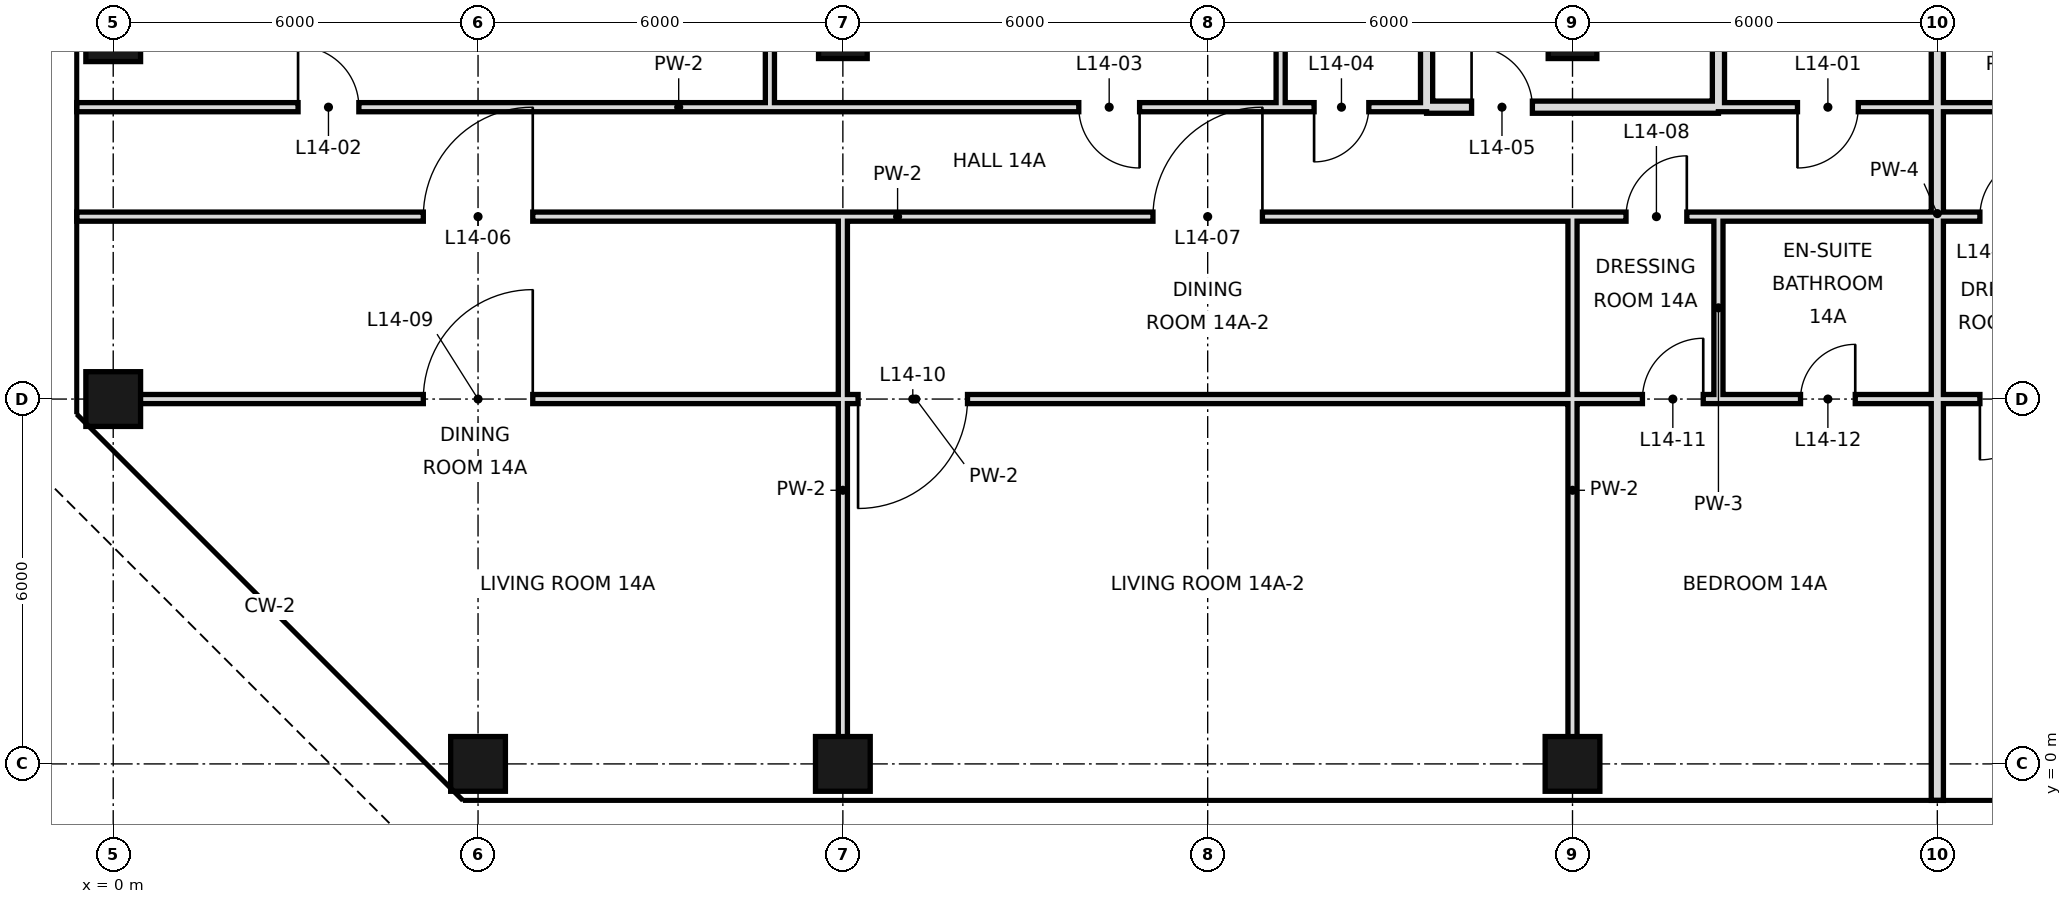
"""IFC4 building model, lengths in metres.
Left out: names, types, materials, properties, quantities, classifications, styles, units other than length and angle.
Written with IfcOpenShell. Run it as: python <this file> out.ifc"""

import sys

from ifc_helpers import new_model, si_unit, direction, frame, frame_2d, origin, origin_2d, place, context, subcontext, project, spatial, rectangle, hollow_rectangle, extrude, element, fill, save


model = new_model("IFC4")
c1 = context("Model", 3, precision=1e-05, world=origin(), true_north=direction((0.0, 1.0)))
c2 = subcontext(c1, "Body", "Model", "MODEL_VIEW")
j1 = project(units=[si_unit("LENGTHUNIT", "METRE"), si_unit("PLANEANGLEUNIT", "RADIAN")], contexts=[c1])
p1 = place(None, origin())
s1 = spatial("IfcSite", under=j1, at=p1, CompositionType="ELEMENT")
p2 = place(p1, origin())
s2 = spatial("IfcBuilding", under=s1, at=p2, CompositionType="ELEMENT")
p3 = place(p2, frame((0.0, 0.0, 71.4)))
s3 = spatial("IfcBuildingStorey", under=s2, at=p3, CompositionType="ELEMENT", Elevation=71.4)
for number, where, z_axis, x_axis in (
    (1, (0.0, 6.0, 0.0), (0.0, 0.0, 1.0), (1.0, 0.0, 0.0)),
    (2, (0.0, 12.0, 0.0), (0.0, 0.0, 1.0), (1.0, 0.0, 0.0)),
    (3, (6.0, 0.0, 0.0), (0.0, 0.0, 1.0), (1.0, 0.0, 0.0)),
    (4, (12.0, 0.0, 0.0), (0.0, 0.0, 1.0), (1.0, 0.0, 0.0)),
):
    element("IfcColumn", number, at=place(p3, frame(where, z_axis=z_axis, x_axis=x_axis)), inside=s3, PredefinedType="COLUMN", context=c2, shape_type="SweptSolid", body=[
        extrude(hollow_rectangle(XDim=0.9, YDim=0.9, WallThickness=0.045, at=origin_2d()), origin(), (0.0, 0.0, 1.0), 3.6),
    ])
p4 = place(p3, frame((12.0, 12.0, 0.0), z_axis=(0.0, 0.0, 1.0), x_axis=(1.0, 0.0, 0.0)))
e5 = element("IfcColumn", 5, at=p4, inside=s3, PredefinedType="COLUMN", context=c2, shape_type="SweptSolid", body=[
    extrude(hollow_rectangle(XDim=0.8, YDim=0.8, WallThickness=0.04, at=origin_2d()), origin(), (0.0, 0.0, 1.0), 3.6),
])
p5 = place(p3, frame((24.0, 0.0, 0.0), z_axis=(0.0, 0.0, 1.0), x_axis=(1.0, 0.0, 0.0)))
e6 = element("IfcColumn", 6, at=p5, inside=s3, PredefinedType="COLUMN", context=c2, shape_type="SweptSolid", body=[
    extrude(hollow_rectangle(XDim=0.9, YDim=0.9, WallThickness=0.045, at=origin_2d()), origin(), (0.0, 0.0, 1.0), 3.6),
])
p6 = place(p3, frame((24.0, 12.0, 0.0), z_axis=(0.0, 0.0, 1.0), x_axis=(1.0, 0.0, 0.0)))
e7 = element("IfcColumn", 7, at=p6, inside=s3, PredefinedType="COLUMN", context=c2, shape_type="SweptSolid", body=[
    extrude(hollow_rectangle(XDim=0.8, YDim=0.8, WallThickness=0.04, at=origin_2d()), origin(), (0.0, 0.0, 1.0), 3.6),
])
p7 = place(p3, frame((10.8, 10.8, 0.0), z_axis=(0.0, 0.0, 1.0), x_axis=(0.0, 1.0, 0.0)))
e8 = element("IfcWall", 8, at=p7, inside=s3, PredefinedType="PARTITIONING", context=c2, shape_type="SweptSolid", body=[
    extrude(rectangle(XDim=7.9, YDim=0.15, at=frame_2d((3.95, 0.0))), origin(), (0.0, 0.0, 1.0), 3.42),
])
p8 = place(p3, frame((12.0, 0.0, 0.0), z_axis=(0.0, 0.0, 1.0), x_axis=(0.0, 1.0, 0.0)))
e9 = element("IfcWall", 9, at=p8, inside=s3, PredefinedType="PARTITIONING", context=c2, shape_type="SweptSolid", body=[
    extrude(rectangle(XDim=9.0, YDim=0.15, at=frame_2d((4.5, 0.0))), origin(), (0.0, 0.0, 1.0), 2.72),
])
p9 = place(p3, frame((19.2, 10.8, 0.0), z_axis=(0.0, 0.0, 1.0), x_axis=(0.0, 1.0, 0.0)))
e10 = element("IfcWall", 10, at=p9, inside=s3, PredefinedType="PARTITIONING", context=c2, shape_type="SweptSolid", body=[
    extrude(rectangle(XDim=7.9, YDim=0.15, at=frame_2d((3.95, 0.0))), origin(), (0.0, 0.0, 1.0), 3.42),
])
p10 = place(p3, frame((21.6, 10.8, 0.0), z_axis=(0.0, 0.0, 1.0), x_axis=(0.0, 1.0, 0.0)))
e11 = element("IfcWall", 11, at=p10, inside=s3, PredefinedType="SOLIDWALL", context=c2, shape_type="SweptSolid", body=[
    extrude(rectangle(XDim=7.9, YDim=0.2, at=frame_2d((3.95, 0.0))), origin(), (0.0, 0.0, 1.0), 2.72),
])
p11 = place(p3, frame((24.0, 0.0, 0.0), z_axis=(0.0, 0.0, 1.0), x_axis=(0.0, 1.0, 0.0)))
e12 = element("IfcWall", 12, at=p11, inside=s3, PredefinedType="PARTITIONING", context=c2, shape_type="SweptSolid", body=[
    extrude(rectangle(XDim=9.0, YDim=0.15, at=frame_2d((4.5, 0.0))), origin(), (0.0, 0.0, 1.0), 2.72),
])
p12 = place(p3, frame((26.4, 10.8, 0.0), z_axis=(0.0, 0.0, 1.0), x_axis=(0.0, 1.0, 0.0)))
e13 = element("IfcWall", 13, at=p12, inside=s3, PredefinedType="SOLIDWALL", context=c2, shape_type="SweptSolid", body=[
    extrude(rectangle(XDim=7.9, YDim=0.2, at=frame_2d((3.95, 0.0))), origin(), (0.0, 0.0, 1.0), 2.72),
])
p13 = place(p3, frame((26.4, 6.0, 0.0), z_axis=(0.0, 0.0, 1.0), x_axis=(0.0, 1.0, 0.0)))
e14 = element("IfcWall", 14, at=p13, inside=s3, PredefinedType="PARTITIONING", context=c2, shape_type="SweptSolid", body=[
    extrude(rectangle(XDim=3.0, YDim=0.15, at=frame_2d((1.5, 0.0))), origin(), (0.0, 0.0, 1.0), 3.42),
])
p14 = place(p3, frame((30.0, -0.6, 0.0), z_axis=(0.0, 0.0, 1.0), x_axis=(0.0, 1.0, 0.0)))
e15 = element("IfcWall", 15, at=p14, inside=s3, PredefinedType="SOLIDWALL", context=c2, shape_type="SweptSolid", body=[
    extrude(rectangle(XDim=19.3, YDim=0.2, at=frame_2d((9.65, 0.0))), origin(), (0.0, 0.0, 1.0), 2.72),
])
p15 = place(p3, frame((21.6, 10.8, 0.0), z_axis=(0.0, 0.0, 1.0), x_axis=(1.0, 0.0, 0.0)))
e16 = element("IfcWall", 16, at=p15, inside=s3, PredefinedType="SOLIDWALL", context=c2, shape_type="SweptSolid", body=[
    extrude(rectangle(XDim=4.8, YDim=0.2, at=frame_2d((2.4, 0.0))), origin(), (0.0, 0.0, 1.0), 2.72),
])
p16 = place(p15, frame((0.74, 0.0, 0.0)))
e17 = element("IfcOpeningElement", 17, at=p16, cuts=e16, PredefinedType="OPENING", context=c2, shape_type="SweptSolid", body=[
    extrude(rectangle(XDim=1.0, YDim=2.4, at=frame_2d((0.5, 1.2))), frame((0.0, 0.11, 0.0), z_axis=(0.0, -1.0, 0.0), x_axis=(1.0, 0.0, 0.0)), (0.0, 0.0, 1.0), 0.22),
])
p17 = place(p3, frame((-0.6, 10.8, 0.0), z_axis=(0.0, 0.0, 1.0), x_axis=(1.0, 0.0, 0.0)))
e18 = element("IfcWall", 18, at=p17, inside=s3, PredefinedType="PARTITIONING", context=c2, shape_type="SweptSolid", body=[
    extrude(rectangle(XDim=19.8, YDim=0.15, at=frame_2d((9.9, 0.0))), origin(), (0.0, 0.0, 1.0), 3.42),
])
p18 = place(p17, frame((3.64, 0.0, 0.0)))
e19 = element("IfcOpeningElement", 19, at=p18, cuts=e18, PredefinedType="OPENING", context=c2, shape_type="SweptSolid", body=[
    extrude(rectangle(XDim=1.0, YDim=2.4, at=frame_2d((0.5, 1.2))), frame((0.0, 0.085, 0.0), z_axis=(0.0, -1.0, 0.0), x_axis=(1.0, 0.0, 0.0)), (0.0, 0.0, 1.0), 0.17),
])
p19 = place(p17, frame((16.48, 0.0, 0.0)))
e20 = element("IfcOpeningElement", 20, at=p19, cuts=e18, PredefinedType="OPENING", context=c2, shape_type="SweptSolid", body=[
    extrude(rectangle(XDim=1.0, YDim=2.4, at=frame_2d((0.5, 1.2))), frame((0.0, 0.085, 0.0), z_axis=(0.0, -1.0, 0.0), x_axis=(1.0, 0.0, 0.0)), (0.0, 0.0, 1.0), 0.17),
])
p20 = place(p3, frame((26.4, 10.8, 0.0), z_axis=(0.0, 0.0, 1.0), x_axis=(1.0, 0.0, 0.0)))
e21 = element("IfcWall", 21, at=p20, inside=s3, PredefinedType="PARTITIONING", context=c2, shape_type="SweptSolid", body=[
    extrude(rectangle(XDim=9.6, YDim=0.15, at=frame_2d((4.8, 0.0))), origin(), (0.0, 0.0, 1.0), 3.42),
])
p21 = place(p20, frame((1.3, 0.0, 0.0)))
e22 = element("IfcOpeningElement", 22, at=p21, cuts=e21, PredefinedType="OPENING", context=c2, shape_type="SweptSolid", body=[
    extrude(rectangle(XDim=1.0, YDim=2.4, at=frame_2d((0.5, 1.2))), frame((0.0, 0.085, 0.0), z_axis=(0.0, -1.0, 0.0), x_axis=(1.0, 0.0, 0.0)), (0.0, 0.0, 1.0), 0.17),
])
p22 = place(p20, frame((7.0, 0.0, 0.0)))
e23 = element("IfcOpeningElement", 23, at=p22, cuts=e21, PredefinedType="OPENING", context=c2, shape_type="SweptSolid", body=[
    extrude(rectangle(XDim=1.0, YDim=2.4, at=frame_2d((0.5, 1.2))), frame((0.0, 0.085, 0.0), z_axis=(0.0, -1.0, 0.0), x_axis=(1.0, 0.0, 0.0)), (0.0, 0.0, 1.0), 0.17),
])
p23 = place(p3, frame((19.2, 10.8, 0.0), z_axis=(0.0, 0.0, 1.0), x_axis=(1.0, 0.0, 0.0)))
e24 = element("IfcWall", 24, at=p23, inside=s3, PredefinedType="PARTITIONING", context=c2, shape_type="SweptSolid", body=[
    extrude(rectangle(XDim=2.4, YDim=0.15, at=frame_2d((1.2, 0.0))), origin(), (0.0, 0.0, 1.0), 3.42),
])
p24 = place(p23, frame((0.55, 0.0, 0.0)))
e25 = element("IfcOpeningElement", 25, at=p24, cuts=e24, PredefinedType="OPENING", context=c2, shape_type="SweptSolid", body=[
    extrude(rectangle(XDim=0.9, YDim=2.4, at=frame_2d((0.45, 1.2))), frame((0.0, 0.085, 0.0), z_axis=(0.0, -1.0, 0.0), x_axis=(1.0, 0.0, 0.0)), (0.0, 0.0, 1.0), 0.17),
])
p25 = place(p3, frame((0.0, 6.0, 0.0), z_axis=(0.0, 0.0, 1.0), x_axis=(1.0, 0.0, 0.0)))
e26 = element("IfcWall", 26, at=p25, inside=s3, PredefinedType="PARTITIONING", context=c2, shape_type="SweptSolid", body=[
    extrude(rectangle(XDim=26.4, YDim=0.15, at=frame_2d((13.2, 0.0))), origin(), (0.0, 0.0, 1.0), 2.97),
])
p26 = place(p25, frame((5.1, 0.0, 0.0)))
e27 = element("IfcOpeningElement", 27, at=p26, cuts=e26, PredefinedType="OPENING", context=c2, shape_type="SweptSolid", body=[
    extrude(rectangle(XDim=1.8, YDim=2.4, at=frame_2d((0.9, 1.2))), frame((0.0, 0.085, 0.0), z_axis=(0.0, -1.0, 0.0), x_axis=(1.0, 0.0, 0.0)), (0.0, 0.0, 1.0), 0.17),
])
p27 = place(p25, frame((12.25, 0.0, 0.0)))
e28 = element("IfcOpeningElement", 28, at=p27, cuts=e26, PredefinedType="OPENING", context=c2, shape_type="SweptSolid", body=[
    extrude(rectangle(XDim=1.8, YDim=2.4, at=frame_2d((0.9, 1.2))), frame((0.0, 0.085, 0.0), z_axis=(0.0, -1.0, 0.0), x_axis=(1.0, 0.0, 0.0)), (0.0, 0.0, 1.0), 0.17),
])
p28 = place(p25, frame((25.15, 0.0, 0.0)))
e29 = element("IfcOpeningElement", 29, at=p28, cuts=e26, PredefinedType="OPENING", context=c2, shape_type="SweptSolid", body=[
    extrude(rectangle(XDim=1.0, YDim=2.4, at=frame_2d((0.5, 1.2))), frame((0.0, 0.085, 0.0), z_axis=(0.0, -1.0, 0.0), x_axis=(1.0, 0.0, 0.0)), (0.0, 0.0, 1.0), 0.17),
])
p29 = place(p3, frame((30.0, 6.0, 0.0), z_axis=(0.0, 0.0, 1.0), x_axis=(1.0, 0.0, 0.0)))
e30 = element("IfcWall", 30, at=p29, inside=s3, PredefinedType="PARTITIONING", context=c2, shape_type="SweptSolid", body=[
    extrude(rectangle(XDim=2.4, YDim=0.15, at=frame_2d((1.2, 0.0))), origin(), (0.0, 0.0, 1.0), 2.97),
])
p30 = place(p29, frame((0.7, 0.0, 0.0)))
e31 = element("IfcOpeningElement", 31, at=p30, cuts=e30, PredefinedType="OPENING", context=c2, shape_type="SweptSolid", body=[
    extrude(rectangle(XDim=1.0, YDim=2.4, at=frame_2d((0.5, 1.2))), frame((0.0, 0.085, 0.0), z_axis=(0.0, -1.0, 0.0), x_axis=(1.0, 0.0, 0.0)), (0.0, 0.0, 1.0), 0.17),
])
p31 = place(p3, frame((26.4, 6.0, 0.0), z_axis=(0.0, 0.0, 1.0), x_axis=(1.0, 0.0, 0.0)))
e32 = element("IfcWall", 32, at=p31, inside=s3, PredefinedType="PARTITIONING", context=c2, shape_type="SweptSolid", body=[
    extrude(rectangle(XDim=3.6, YDim=0.15, at=frame_2d((1.8, 0.0))), origin(), (0.0, 0.0, 1.0), 2.97),
])
p32 = place(p31, frame((1.35, 0.0, 0.0)))
e33 = element("IfcOpeningElement", 33, at=p32, cuts=e32, PredefinedType="OPENING", context=c2, shape_type="SweptSolid", body=[
    extrude(rectangle(XDim=0.9, YDim=2.4, at=frame_2d((0.45, 1.2))), frame((0.0, 0.085, 0.0), z_axis=(0.0, -1.0, 0.0), x_axis=(1.0, 0.0, 0.0)), (0.0, 0.0, 1.0), 0.17),
])
p33 = place(p3, frame((-0.6, 9.0, 0.0), z_axis=(0.0, 0.0, 1.0), x_axis=(1.0, 0.0, 0.0)))
e34 = element("IfcWall", 34, at=p33, inside=s3, PredefinedType="PARTITIONING", context=c2, shape_type="SweptSolid", body=[
    extrude(rectangle(XDim=27.0, YDim=0.15, at=frame_2d((13.5, 0.0))), origin(), (0.0, 0.0, 1.0), 3.42),
])
p34 = place(p33, frame((5.7, 0.0, 0.0)))
e35 = element("IfcOpeningElement", 35, at=p34, cuts=e34, PredefinedType="OPENING", context=c2, shape_type="SweptSolid", body=[
    extrude(rectangle(XDim=1.8, YDim=2.4, at=frame_2d((0.9, 1.2))), frame((0.0, 0.085, 0.0), z_axis=(0.0, -1.0, 0.0), x_axis=(1.0, 0.0, 0.0)), (0.0, 0.0, 1.0), 0.17),
])
p35 = place(p33, frame((17.7, 0.0, 0.0)))
e36 = element("IfcOpeningElement", 36, at=p35, cuts=e34, PredefinedType="OPENING", context=c2, shape_type="SweptSolid", body=[
    extrude(rectangle(XDim=1.8, YDim=2.4, at=frame_2d((0.9, 1.2))), frame((0.0, 0.085, 0.0), z_axis=(0.0, -1.0, 0.0), x_axis=(1.0, 0.0, 0.0)), (0.0, 0.0, 1.0), 0.17),
])
p36 = place(p33, frame((25.48, 0.0, 0.0)))
e37 = element("IfcOpeningElement", 37, at=p36, cuts=e34, PredefinedType="OPENING", context=c2, shape_type="SweptSolid", body=[
    extrude(rectangle(XDim=1.0, YDim=2.4, at=frame_2d((0.5, 1.2))), frame((0.0, 0.085, 0.0), z_axis=(0.0, -1.0, 0.0), x_axis=(1.0, 0.0, 0.0)), (0.0, 0.0, 1.0), 0.17),
])
p37 = place(p3, frame((30.0, 9.0, 0.0), z_axis=(0.0, 0.0, 1.0), x_axis=(1.0, 0.0, 0.0)))
e38 = element("IfcWall", 38, at=p37, inside=s3, PredefinedType="PARTITIONING", context=c2, shape_type="SweptSolid", body=[
    extrude(rectangle(XDim=2.4, YDim=0.15, at=frame_2d((1.2, 0.0))), origin(), (0.0, 0.0, 1.0), 3.42),
])
p38 = place(p37, frame((0.7, 0.0, 0.0)))
e39 = element("IfcOpeningElement", 39, at=p38, cuts=e38, PredefinedType="OPENING", context=c2, shape_type="SweptSolid", body=[
    extrude(rectangle(XDim=1.0, YDim=2.4, at=frame_2d((0.5, 1.2))), frame((0.0, 0.085, 0.0), z_axis=(0.0, -1.0, 0.0), x_axis=(1.0, 0.0, 0.0)), (0.0, 0.0, 1.0), 0.17),
])
p39 = place(p3, frame((26.4, 9.0, 0.0), z_axis=(0.0, 0.0, 1.0), x_axis=(1.0, 0.0, 0.0)))
e40 = element("IfcWall", 40, at=p39, inside=s3, PredefinedType="PARTITIONING", context=c2, shape_type="SweptSolid", body=[
    extrude(rectangle(XDim=3.6, YDim=0.15, at=frame_2d((1.8, 0.0))), origin(), (0.0, 0.0, 1.0), 3.42),
])
p40 = place(p21, frame((1.0, 0.0, 0.0), z_axis=(0.0, 0.0, 1.0), x_axis=(-1.0, 0.0, 0.0)))
e41 = element("IfcDoor", 41, at=p40, inside=s3, OperationType="SINGLE_SWING_RIGHT", PredefinedType="DOOR", context=c2, shape_type="SweptSolid", body=[
    extrude(rectangle(XDim=1.0, YDim=2.4, at=frame_2d((0.5, 1.2))), frame((0.0, 0.025, 0.0), z_axis=(0.0, -1.0, 0.0), x_axis=(1.0, 0.0, 0.0)), (0.0, 0.0, 1.0), 0.05),
])
fill(e22, e41)
p41 = place(p18, origin())
e42 = element("IfcDoor", 42, at=p41, inside=s3, OperationType="SINGLE_SWING_LEFT", PredefinedType="DOOR", context=c2, shape_type="SweptSolid", body=[
    extrude(rectangle(XDim=1.0, YDim=2.4, at=frame_2d((0.5, 1.2))), frame((0.0, 0.025, 0.0), z_axis=(0.0, -1.0, 0.0), x_axis=(1.0, 0.0, 0.0)), (0.0, 0.0, 1.0), 0.05),
])
fill(e19, e42)
p42 = place(p19, origin())
e43 = element("IfcDoor", 43, at=p42, inside=s3, OperationType="SINGLE_SWING_RIGHT", PredefinedType="DOOR", context=c2, shape_type="SweptSolid", body=[
    extrude(rectangle(XDim=1.0, YDim=2.4, at=frame_2d((0.5, 1.2))), frame((0.0, 0.025, 0.0), z_axis=(0.0, -1.0, 0.0), x_axis=(1.0, 0.0, 0.0)), (0.0, 0.0, 1.0), 0.05),
])
fill(e20, e43)
p43 = place(p24, frame((0.9, 0.0, 0.0), z_axis=(0.0, 0.0, 1.0), x_axis=(-1.0, 0.0, 0.0)))
e44 = element("IfcDoor", 44, at=p43, inside=s3, OperationType="SINGLE_SWING_RIGHT", PredefinedType="DOOR", context=c2, shape_type="SweptSolid", body=[
    extrude(rectangle(XDim=0.9, YDim=2.4, at=frame_2d((0.45, 1.2))), frame((0.0, 0.025, 0.0), z_axis=(0.0, -1.0, 0.0), x_axis=(1.0, 0.0, 0.0)), (0.0, 0.0, 1.0), 0.05),
])
fill(e25, e44)
p44 = place(p16, origin())
e45 = element("IfcDoor", 45, at=p44, inside=s3, OperationType="SINGLE_SWING_LEFT", PredefinedType="DOOR", context=c2, shape_type="SweptSolid", body=[
    extrude(rectangle(XDim=1.0, YDim=2.4, at=frame_2d((0.5, 1.2))), frame((0.0, 0.025, 0.0), z_axis=(0.0, -1.0, 0.0), x_axis=(1.0, 0.0, 0.0)), (0.0, 0.0, 1.0), 0.05),
])
fill(e17, e45)
p45 = place(p34, frame((1.8, 0.0, 0.0), z_axis=(0.0, 0.0, 1.0), x_axis=(-1.0, 0.0, 0.0)))
e46 = element("IfcDoor", 46, at=p45, inside=s3, OperationType="SINGLE_SWING_LEFT", PredefinedType="DOOR", context=c2, shape_type="SweptSolid", body=[
    extrude(rectangle(XDim=1.8, YDim=2.4, at=frame_2d((0.9, 1.2))), frame((0.0, 0.025, 0.0), z_axis=(0.0, -1.0, 0.0), x_axis=(1.0, 0.0, 0.0)), (0.0, 0.0, 1.0), 0.05),
])
fill(e35, e46)
p46 = place(p35, frame((1.8, 0.0, 0.0), z_axis=(0.0, 0.0, 1.0), x_axis=(-1.0, 0.0, 0.0)))
e47 = element("IfcDoor", 47, at=p46, inside=s3, OperationType="SINGLE_SWING_LEFT", PredefinedType="DOOR", context=c2, shape_type="SweptSolid", body=[
    extrude(rectangle(XDim=1.8, YDim=2.4, at=frame_2d((0.9, 1.2))), frame((0.0, 0.025, 0.0), z_axis=(0.0, -1.0, 0.0), x_axis=(1.0, 0.0, 0.0)), (0.0, 0.0, 1.0), 0.05),
])
fill(e36, e47)
p47 = place(p36, frame((1.0, 0.0, 0.0), z_axis=(0.0, 0.0, 1.0), x_axis=(-1.0, 0.0, 0.0)))
e48 = element("IfcDoor", 48, at=p47, inside=s3, OperationType="SINGLE_SWING_LEFT", PredefinedType="DOOR", context=c2, shape_type="SweptSolid", body=[
    extrude(rectangle(XDim=1.0, YDim=2.4, at=frame_2d((0.5, 1.2))), frame((0.0, 0.025, 0.0), z_axis=(0.0, -1.0, 0.0), x_axis=(1.0, 0.0, 0.0)), (0.0, 0.0, 1.0), 0.05),
])
fill(e37, e48)
p48 = place(p26, frame((1.8, 0.0, 0.0), z_axis=(0.0, 0.0, 1.0), x_axis=(-1.0, 0.0, 0.0)))
e49 = element("IfcDoor", 49, at=p48, inside=s3, OperationType="SINGLE_SWING_LEFT", PredefinedType="DOOR", context=c2, shape_type="SweptSolid", body=[
    extrude(rectangle(XDim=1.8, YDim=2.4, at=frame_2d((0.9, 1.2))), frame((0.0, 0.025, 0.0), z_axis=(0.0, -1.0, 0.0), x_axis=(1.0, 0.0, 0.0)), (0.0, 0.0, 1.0), 0.05),
])
fill(e27, e49)
p49 = place(p27, frame((1.8, 0.0, 0.0), z_axis=(0.0, 0.0, 1.0), x_axis=(-1.0, 0.0, 0.0)))
e50 = element("IfcDoor", 50, at=p49, inside=s3, OperationType="SINGLE_SWING_RIGHT", PredefinedType="DOOR", context=c2, shape_type="SweptSolid", body=[
    extrude(rectangle(XDim=1.8, YDim=2.4, at=frame_2d((0.9, 1.2))), frame((0.0, 0.025, 0.0), z_axis=(0.0, -1.0, 0.0), x_axis=(1.0, 0.0, 0.0)), (0.0, 0.0, 1.0), 0.05),
])
fill(e28, e50)
p50 = place(p28, frame((1.0, 0.0, 0.0), z_axis=(0.0, 0.0, 1.0), x_axis=(-1.0, 0.0, 0.0)))
e51 = element("IfcDoor", 51, at=p50, inside=s3, OperationType="SINGLE_SWING_LEFT", PredefinedType="DOOR", context=c2, shape_type="SweptSolid", body=[
    extrude(rectangle(XDim=1.0, YDim=2.4, at=frame_2d((0.5, 1.2))), frame((0.0, 0.025, 0.0), z_axis=(0.0, -1.0, 0.0), x_axis=(1.0, 0.0, 0.0)), (0.0, 0.0, 1.0), 0.05),
])
fill(e29, e51)
p51 = place(p32, frame((0.9, 0.0, 0.0), z_axis=(0.0, 0.0, 1.0), x_axis=(-1.0, 0.0, 0.0)))
e52 = element("IfcDoor", 52, at=p51, inside=s3, OperationType="SINGLE_SWING_LEFT", PredefinedType="DOOR", context=c2, shape_type="SweptSolid", body=[
    extrude(rectangle(XDim=0.9, YDim=2.4, at=frame_2d((0.45, 1.2))), frame((0.0, 0.025, 0.0), z_axis=(0.0, -1.0, 0.0), x_axis=(1.0, 0.0, 0.0)), (0.0, 0.0, 1.0), 0.05),
])
fill(e33, e52)
p52 = place(p38, frame((1.0, 0.0, 0.0), z_axis=(0.0, 0.0, 1.0), x_axis=(-1.0, 0.0, 0.0)))
e53 = element("IfcDoor", 53, at=p52, inside=s3, OperationType="SINGLE_SWING_LEFT", PredefinedType="DOOR", context=c2, shape_type="SweptSolid", body=[
    extrude(rectangle(XDim=1.0, YDim=2.4, at=frame_2d((0.5, 1.2))), frame((0.0, 0.025, 0.0), z_axis=(0.0, -1.0, 0.0), x_axis=(1.0, 0.0, 0.0)), (0.0, 0.0, 1.0), 0.05),
])
fill(e39, e53)
p53 = place(p30, frame((1.0, 0.0, 0.0), z_axis=(0.0, 0.0, 1.0), x_axis=(-1.0, 0.0, 0.0)))
e54 = element("IfcDoor", 54, at=p53, inside=s3, OperationType="SINGLE_SWING_RIGHT", PredefinedType="DOOR", context=c2, shape_type="SweptSolid", body=[
    extrude(rectangle(XDim=1.0, YDim=2.4, at=frame_2d((0.5, 1.2))), frame((0.0, 0.025, 0.0), z_axis=(0.0, -1.0, 0.0), x_axis=(1.0, 0.0, 0.0)), (0.0, 0.0, 1.0), 0.05),
])
fill(e31, e54)
save(model, sys.argv[1])
